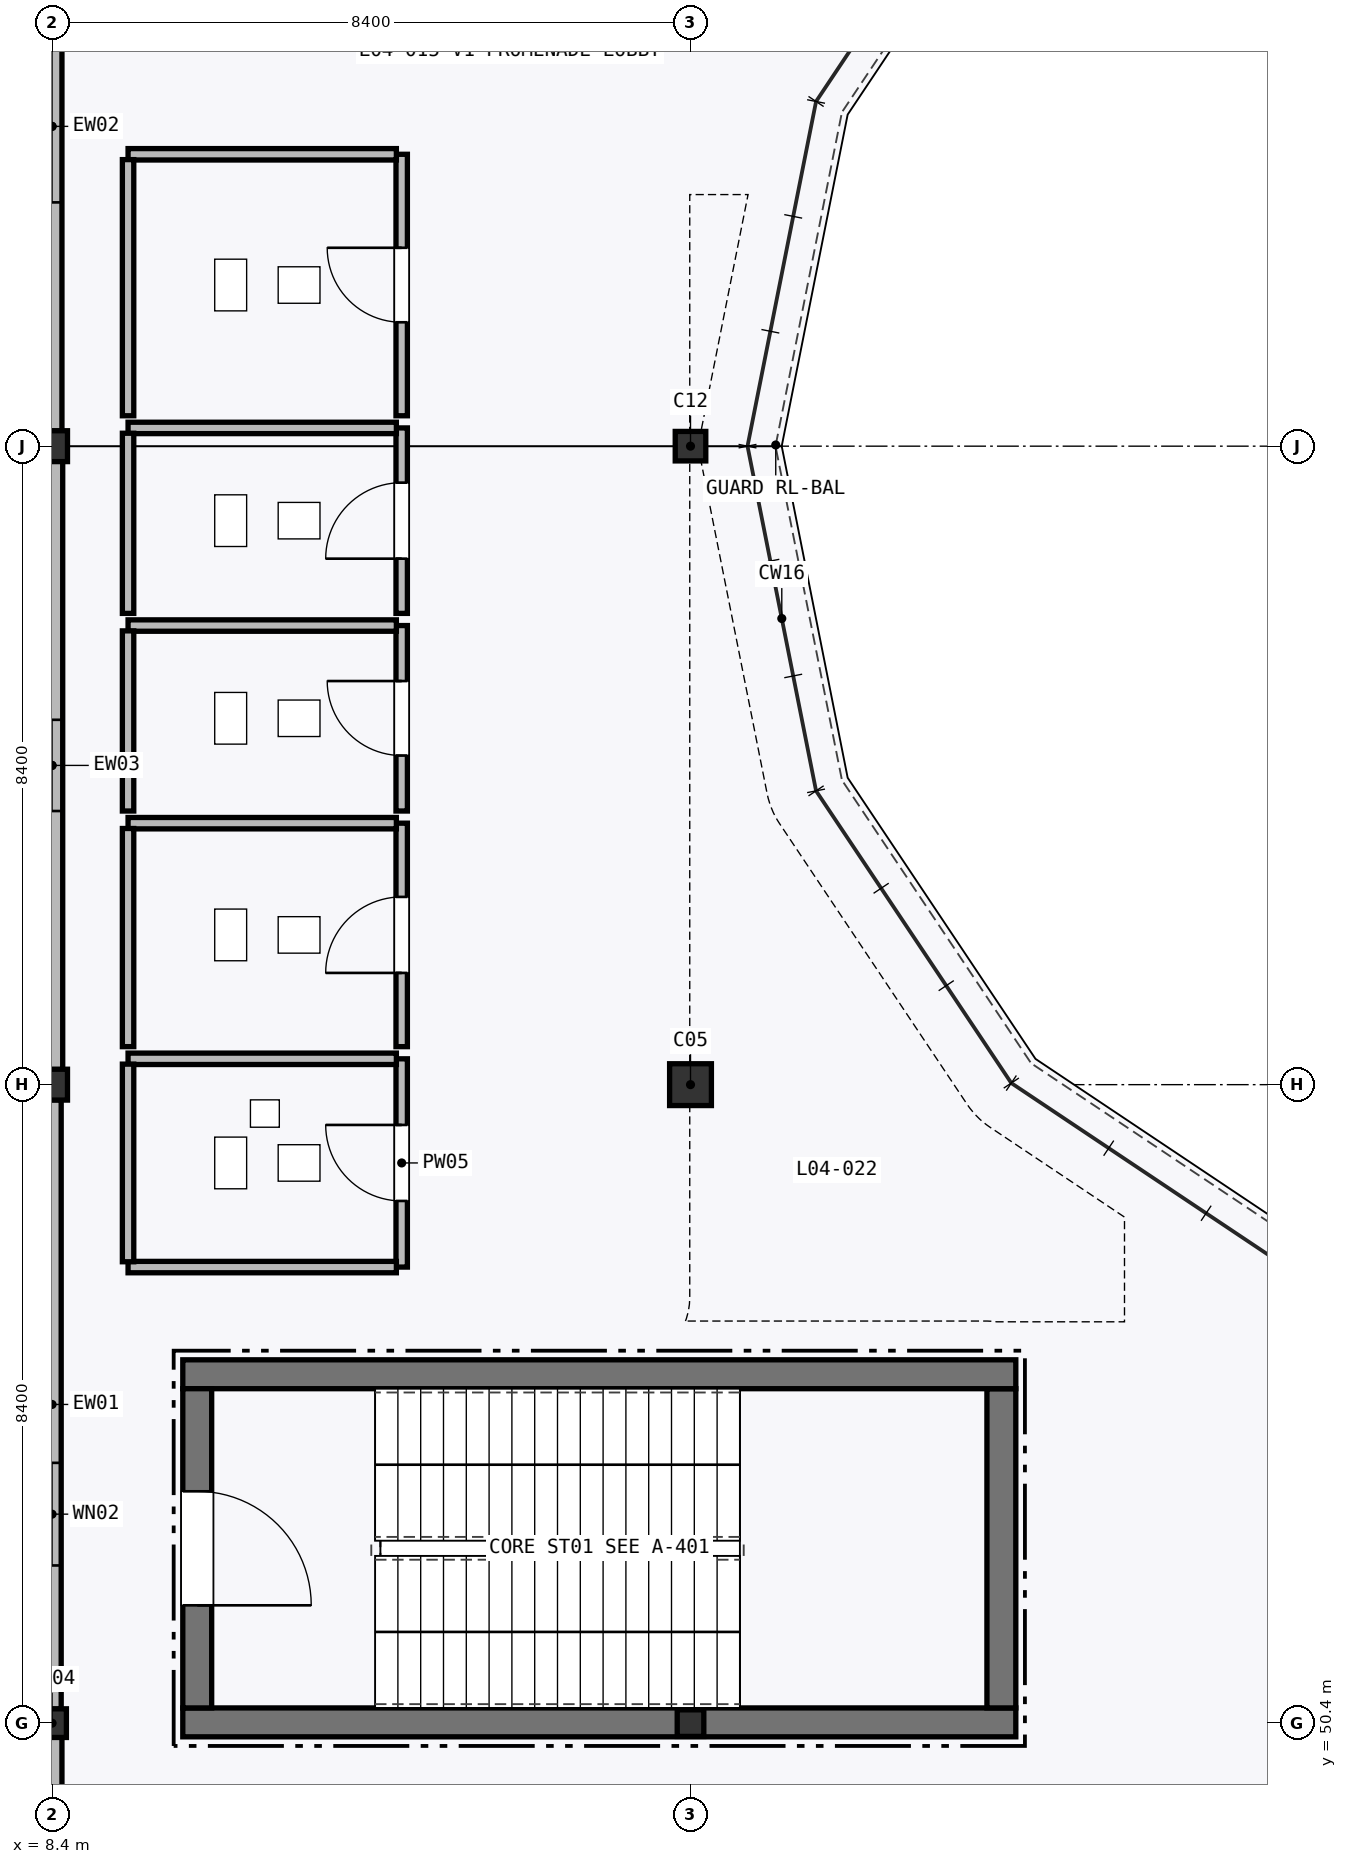
"""IFC4 building model, lengths in metres.
Left out: names, types, materials, properties, quantities, classifications, styles, units other than length and angle.
Written with IfcOpenShell. Run it as: python <this file> out.ifc"""

import sys

from ifc_helpers import new_model, si_unit, direction, frame, frame_2d, origin, origin_2d, place, context, subcontext, project, spatial, rectangle, hollow_rectangle, hollow_circle, i_section, extrude, element, fill, save


model = new_model("IFC4")
c1 = context("Model", 3, precision=1e-05, world=origin(), true_north=direction((0.0, 1.0)))
c2 = subcontext(c1, "Body", "Model", "MODEL_VIEW")
j1 = project(units=[si_unit("LENGTHUNIT", "METRE"), si_unit("PLANEANGLEUNIT", "RADIAN")], contexts=[c1])
p1 = place(None, origin())
s1 = spatial("IfcSite", under=j1, at=p1, CompositionType="ELEMENT")
p2 = place(p1, origin())
s2 = spatial("IfcBuilding", under=s1, at=p2, CompositionType="ELEMENT")
p3 = place(p2, frame((0.0, 0.0, 16.5)))
s3 = spatial("IfcBuildingStorey", under=s2, at=p3, CompositionType="ELEMENT", Elevation=16.5)
p4 = place(p3, frame((8.4, 50.4, 0.0), z_axis=(0.0, 0.0, 1.0), x_axis=(1.0, 0.0, 0.0)))
e1 = element("IfcColumn", 1, at=p4, inside=s3, PredefinedType="COLUMN", context=c2, shape_type="SweptSolid", body=[
    extrude(hollow_circle(Radius=0.188, WallThickness=0.014, at=origin_2d()), origin(), (0.0, 0.0, 1.0), 5.1),
])
for number, where, z_axis, x_axis in (
    (2, (8.4, 58.8, 0.0), (0.0, 0.0, 1.0), (1.0, 0.0, 0.0)),
    (3, (8.4, 67.2, 0.0), (0.0, 0.0, 1.0), (1.0, 0.0, 0.0)),
):
    element("IfcColumn", number, at=place(p3, frame(where, z_axis=z_axis, x_axis=x_axis)), inside=s3, PredefinedType="COLUMN", context=c2, shape_type="SweptSolid", body=[
        extrude(hollow_circle(Radius=0.203, WallThickness=0.016, at=origin_2d()), origin(), (0.0, 0.0, 1.0), 5.1),
    ])
p5 = place(p3, frame((16.8, 50.4, 0.0), z_axis=(0.0, 0.0, 1.0), x_axis=(1.0, 0.0, 0.0)))
e4 = element("IfcColumn", 4, at=p5, inside=s3, PredefinedType="COLUMN", context=c2, shape_type="SweptSolid", body=[
    extrude(i_section(OverallWidth=0.35, OverallDepth=0.35, WebThickness=0.012, FlangeThickness=0.019, FilletRadius=0.02, at=origin_2d()), origin(), (0.0, 0.0, 1.0), 5.1),
])
p6 = place(p3, frame((16.8, 58.8, 0.0), z_axis=(0.0, 0.0, 1.0), x_axis=(1.0, 0.0, 0.0)))
e5 = element("IfcColumn", 5, at=p6, inside=s3, PredefinedType="COLUMN", context=c2, shape_type="SweptSolid", body=[
    extrude(hollow_rectangle(XDim=0.55, YDim=0.55, WallThickness=0.022, at=origin_2d()), origin(), (0.0, 0.0, 1.0), 5.1),
])
p7 = place(p3, frame((16.8, 67.2, 0.0), z_axis=(0.0, 0.0, 1.0), x_axis=(1.0, 0.0, 0.0)))
e6 = element("IfcColumn", 6, at=p7, inside=s3, PredefinedType="COLUMN", context=c2, shape_type="SweptSolid", body=[
    extrude(i_section(OverallWidth=0.402, OverallDepth=0.388, WebThickness=0.015, FlangeThickness=0.015, FilletRadius=0.022, at=origin_2d()), origin(), (0.0, 0.0, 1.0), 5.1),
])
p8 = place(p3, frame((8.4, 75.417, 0.0), z_axis=(0.0, 0.0, 1.0), x_axis=(0.0, -1.0, 0.0)))
e7 = element("IfcWall", 7, at=p8, inside=s3, PredefinedType="STANDARD", context=c2, shape_type="SweptSolid", body=[
    extrude(rectangle(XDim=8.019, YDim=0.26, at=frame_2d((4.009, 0.0))), origin(), (0.0, 0.0, 1.0), 4.331),
])
p9 = place(p8, frame((3.009, 0.0, 0.95)))
e8 = element("IfcOpeningElement", 8, at=p9, cuts=e7, PredefinedType="OPENING", context=c2, shape_type="SweptSolid", body=[
    extrude(rectangle(XDim=2.0, YDim=1.6, at=frame_2d((1.0, 0.8))), frame((0.0, 0.14, 0.0), z_axis=(0.0, -1.0, 0.0), x_axis=(1.0, 0.0, 0.0)), (0.0, 0.0, 1.0), 0.28),
])
p10 = place(p3, frame((8.4, 67.002, 0.0), z_axis=(0.0, 0.0, 1.0), x_axis=(0.0, -1.0, 0.0)))
e9 = element("IfcWall", 9, at=p10, inside=s3, PredefinedType="STANDARD", context=c2, shape_type="SweptSolid", body=[
    extrude(rectangle(XDim=8.004, YDim=0.28, at=frame_2d((4.002, 0.0))), origin(), (0.0, 0.0, 1.0), 4.331),
])
p11 = place(p10, frame((3.402, 0.0, 0.95)))
e10 = element("IfcOpeningElement", 10, at=p11, cuts=e9, PredefinedType="OPENING", context=c2, shape_type="SweptSolid", body=[
    extrude(rectangle(XDim=1.2, YDim=1.8, at=frame_2d((0.6, 0.9))), frame((0.0, 0.15, 0.0), z_axis=(0.0, -1.0, 0.0), x_axis=(1.0, 0.0, 0.0)), (0.0, 0.0, 1.0), 0.3),
])
p12 = place(p3, frame((8.4, 58.602, 0.0), z_axis=(0.0, 0.0, 1.0), x_axis=(0.0, -1.0, 0.0)))
e11 = element("IfcWall", 11, at=p12, inside=s3, PredefinedType="STANDARD", context=c2, shape_type="SweptSolid", body=[
    extrude(rectangle(XDim=8.019, YDim=0.24, at=frame_2d((4.009, 0.0))), origin(), (0.0, 0.0, 1.0), 4.331),
])
p13 = place(p12, frame((4.778, 0.0, 0.95)))
e12 = element("IfcOpeningElement", 12, at=p13, cuts=e11, PredefinedType="OPENING", context=c2, shape_type="SweptSolid", body=[
    extrude(rectangle(XDim=1.35, YDim=1.8, at=frame_2d((0.675, 0.9))), frame((0.0, 0.13, 0.0), z_axis=(0.0, -1.0, 0.0), x_axis=(1.0, 0.0, 0.0)), (0.0, 0.0, 1.0), 0.26),
])
p14 = place(p3, frame((8.4, 50.217, 0.0), z_axis=(0.0, 0.0, 1.0), x_axis=(0.0, -1.0, 0.0)))
e13 = element("IfcWall", 13, at=p14, inside=s3, PredefinedType="STANDARD", context=c2, shape_type="SweptSolid", body=[
    extrude(rectangle(XDim=8.019, YDim=0.26, at=frame_2d((4.009, 0.0))), origin(), (0.0, 0.0, 1.0), 4.32),
])
p15 = place(p14, frame((3.259, 0.0, 0.95)))
e14 = element("IfcOpeningElement", 14, at=p15, cuts=e13, PredefinedType="OPENING", context=c2, shape_type="SweptSolid", body=[
    extrude(rectangle(XDim=1.5, YDim=1.8, at=frame_2d((0.75, 0.9))), frame((0.0, 0.14, 0.0), z_axis=(0.0, -1.0, 0.0), x_axis=(1.0, 0.0, 0.0)), (0.0, 0.0, 1.0), 0.28),
])
p16 = place(p3, frame((10.12, 50.41, 0.0), z_axis=(0.0, 0.0, 1.0), x_axis=(1.0, 0.0, 0.0)))
e15 = element("IfcWall", 15, at=p16, inside=s3, PredefinedType="SHEAR", context=c2, shape_type="SweptSolid", body=[
    extrude(rectangle(XDim=10.96, YDim=0.38, at=frame_2d((5.48, 0.0))), origin(), (0.0, 0.0, 1.0), 4.845),
])
p17 = place(p3, frame((20.89, 50.6, 0.0), z_axis=(0.0, 0.0, 1.0), x_axis=(0.0, 1.0, 0.0)))
e16 = element("IfcWall", 16, at=p17, inside=s3, PredefinedType="SHEAR", context=c2, shape_type="SweptSolid", body=[
    extrude(rectangle(XDim=4.2, YDim=0.38, at=frame_2d((2.1, 0.0))), origin(), (0.0, 0.0, 1.0), 4.845),
])
p18 = place(p3, frame((21.08, 54.99, 0.0), z_axis=(0.0, 0.0, 1.0), x_axis=(-1.0, 0.0, 0.0)))
e17 = element("IfcWall", 17, at=p18, inside=s3, PredefinedType="SHEAR", context=c2, shape_type="SweptSolid", body=[
    extrude(rectangle(XDim=10.96, YDim=0.38, at=frame_2d((5.48, 0.0))), origin(), (0.0, 0.0, 1.0), 4.845),
])
p19 = place(p3, frame((10.31, 54.8, 0.0), z_axis=(0.0, 0.0, 1.0), x_axis=(0.0, -1.0, 0.0)))
e18 = element("IfcWall", 18, at=p19, inside=s3, PredefinedType="SHEAR", context=c2, shape_type="SweptSolid", body=[
    extrude(rectangle(XDim=4.2, YDim=0.38, at=frame_2d((2.1, 0.0))), origin(), (0.0, 0.0, 1.0), 4.845),
])
p20 = place(p19, frame((1.35, 0.0, 0.0)))
e19 = element("IfcOpeningElement", 19, at=p20, cuts=e18, PredefinedType="OPENING", context=c2, shape_type="SweptSolid", body=[
    extrude(rectangle(XDim=1.5, YDim=2.15, at=frame_2d((0.75, 1.075))), frame((0.0, 0.2, 0.0), z_axis=(0.0, -1.0, 0.0), x_axis=(1.0, 0.0, 0.0)), (0.0, 0.0, 1.0), 0.4),
])
p21 = place(p3, frame((13.0, 56.4, 0.0), z_axis=(0.0, 0.0, 1.0), x_axis=(0.0, 1.0, 0.0)))
e20 = element("IfcWall", 20, at=p21, inside=s3, PredefinedType="PARTITIONING", context=c2, shape_type="SweptSolid", body=[
    extrude(rectangle(XDim=2.74, YDim=0.15, at=frame_2d((1.37, 0.0))), origin(), (0.0, 0.0, 1.0), 4.845),
])
p22 = place(p21, frame((0.87, 0.0, 0.0)))
e21 = element("IfcOpeningElement", 21, at=p22, cuts=e20, PredefinedType="OPENING", context=c2, shape_type="SweptSolid", body=[
    extrude(rectangle(XDim=1.0, YDim=2.1, at=frame_2d((0.5, 1.05))), frame((0.0, 0.085, 0.0), z_axis=(0.0, -1.0, 0.0), x_axis=(1.0, 0.0, 0.0)), (0.0, 0.0, 1.0), 0.17),
])
p23 = place(p3, frame((9.4, 56.4, 0.0), z_axis=(0.0, 0.0, 1.0), x_axis=(1.0, 0.0, 0.0)))
e22 = element("IfcWall", 22, at=p23, inside=s3, PredefinedType="PARTITIONING", context=c2, shape_type="SweptSolid", body=[
    extrude(rectangle(XDim=3.53, YDim=0.15, at=frame_2d((1.765, 0.0))), origin(), (0.0, 0.0, 1.0), 4.845),
])
p24 = place(p3, frame((12.93, 59.14, 0.0), z_axis=(0.0, 0.0, 1.0), x_axis=(-1.0, 0.0, 0.0)))
e23 = element("IfcWall", 23, at=p24, inside=s3, PredefinedType="PARTITIONING", context=c2, shape_type="SweptSolid", body=[
    extrude(rectangle(XDim=3.53, YDim=0.15, at=frame_2d((1.765, 0.0))), origin(), (0.0, 0.0, 1.0), 4.029),
])
p25 = place(p3, frame((9.4, 59.07, 0.0), z_axis=(0.0, 0.0, 1.0), x_axis=(0.0, -1.0, 0.0)))
e24 = element("IfcWall", 24, at=p25, inside=s3, PredefinedType="PARTITIONING", context=c2, shape_type="SweptSolid", body=[
    extrude(rectangle(XDim=2.6, YDim=0.15, at=frame_2d((1.3, 0.0))), origin(), (0.0, 0.0, 1.0), 4.845),
])
p26 = place(p3, frame((13.0, 59.3, 0.0), z_axis=(0.0, 0.0, 1.0), x_axis=(0.0, 1.0, 0.0)))
e25 = element("IfcWall", 25, at=p26, inside=s3, PredefinedType="PARTITIONING", context=c2, shape_type="SweptSolid", body=[
    extrude(rectangle(XDim=2.94, YDim=0.15, at=frame_2d((1.47, 0.0))), origin(), (0.0, 0.0, 1.0), 4.845),
])
p27 = place(p26, frame((0.97, 0.0, 0.0)))
e26 = element("IfcOpeningElement", 26, at=p27, cuts=e25, PredefinedType="OPENING", context=c2, shape_type="SweptSolid", body=[
    extrude(rectangle(XDim=1.0, YDim=2.1, at=frame_2d((0.5, 1.05))), frame((0.0, 0.085, 0.0), z_axis=(0.0, -1.0, 0.0), x_axis=(1.0, 0.0, 0.0)), (0.0, 0.0, 1.0), 0.17),
])
p28 = place(p3, frame((12.93, 62.24, 0.0), z_axis=(0.0, 0.0, 1.0), x_axis=(-1.0, 0.0, 0.0)))
e27 = element("IfcWall", 27, at=p28, inside=s3, PredefinedType="PARTITIONING", context=c2, shape_type="SweptSolid", body=[
    extrude(rectangle(XDim=3.53, YDim=0.15, at=frame_2d((1.765, 0.0))), origin(), (0.0, 0.0, 1.0), 4.845),
])
p29 = place(p3, frame((9.4, 62.17, 0.0), z_axis=(0.0, 0.0, 1.0), x_axis=(0.0, -1.0, 0.0)))
e28 = element("IfcWall", 28, at=p29, inside=s3, PredefinedType="PARTITIONING", context=c2, shape_type="SweptSolid", body=[
    extrude(rectangle(XDim=2.87, YDim=0.15, at=frame_2d((1.435, 0.0))), origin(), (0.0, 0.0, 1.0), 4.845),
])
p30 = place(p3, frame((13.0, 62.4, 0.0), z_axis=(0.0, 0.0, 1.0), x_axis=(0.0, 1.0, 0.0)))
e29 = element("IfcWall", 29, at=p30, inside=s3, PredefinedType="PARTITIONING", context=c2, shape_type="SweptSolid", body=[
    extrude(rectangle(XDim=2.44, YDim=0.15, at=frame_2d((1.22, 0.0))), origin(), (0.0, 0.0, 1.0), 4.845),
])
p31 = place(p30, frame((0.73, 0.0, 0.0)))
e30 = element("IfcOpeningElement", 30, at=p31, cuts=e29, PredefinedType="OPENING", context=c2, shape_type="SweptSolid", body=[
    extrude(rectangle(XDim=0.98, YDim=2.1, at=frame_2d((0.49, 1.05))), frame((0.0, 0.085, 0.0), z_axis=(0.0, -1.0, 0.0), x_axis=(1.0, 0.0, 0.0)), (0.0, 0.0, 1.0), 0.17),
])
p32 = place(p3, frame((12.93, 64.84, 0.0), z_axis=(0.0, 0.0, 1.0), x_axis=(-1.0, 0.0, 0.0)))
e31 = element("IfcWall", 31, at=p32, inside=s3, PredefinedType="PARTITIONING", context=c2, shape_type="SweptSolid", body=[
    extrude(rectangle(XDim=3.53, YDim=0.15, at=frame_2d((1.765, 0.0))), origin(), (0.0, 0.0, 1.0), 4.845),
])
p33 = place(p3, frame((9.4, 64.77, 0.0), z_axis=(0.0, 0.0, 1.0), x_axis=(0.0, -1.0, 0.0)))
e32 = element("IfcWall", 32, at=p33, inside=s3, PredefinedType="PARTITIONING", context=c2, shape_type="SweptSolid", body=[
    extrude(rectangle(XDim=2.37, YDim=0.15, at=frame_2d((1.185, 0.0))), origin(), (0.0, 0.0, 1.0), 4.845),
])
p34 = place(p3, frame((13.0, 65.0, 0.0), z_axis=(0.0, 0.0, 1.0), x_axis=(0.0, 1.0, 0.0)))
e33 = element("IfcWall", 33, at=p34, inside=s3, PredefinedType="PARTITIONING", context=c2, shape_type="SweptSolid", body=[
    extrude(rectangle(XDim=2.44, YDim=0.15, at=frame_2d((1.22, 0.0))), origin(), (0.0, 0.0, 1.0), 4.845),
])
p35 = place(p34, frame((0.72, 0.0, 0.0)))
e34 = element("IfcOpeningElement", 34, at=p35, cuts=e33, PredefinedType="OPENING", context=c2, shape_type="SweptSolid", body=[
    extrude(rectangle(XDim=1.0, YDim=2.1, at=frame_2d((0.5, 1.05))), frame((0.0, 0.085, 0.0), z_axis=(0.0, -1.0, 0.0), x_axis=(1.0, 0.0, 0.0)), (0.0, 0.0, 1.0), 0.17),
])
p36 = place(p3, frame((12.93, 67.44, 0.0), z_axis=(0.0, 0.0, 1.0), x_axis=(-1.0, 0.0, 0.0)))
e35 = element("IfcWall", 35, at=p36, inside=s3, PredefinedType="PARTITIONING", context=c2, shape_type="SweptSolid", body=[
    extrude(rectangle(XDim=3.53, YDim=0.15, at=frame_2d((1.765, 0.0))), origin(), (0.0, 0.0, 1.0), 4.231),
])
p37 = place(p3, frame((9.4, 67.37, 0.0), z_axis=(0.0, 0.0, 1.0), x_axis=(0.0, -1.0, 0.0)))
e36 = element("IfcWall", 36, at=p37, inside=s3, PredefinedType="PARTITIONING", context=c2, shape_type="SweptSolid", body=[
    extrude(rectangle(XDim=2.37, YDim=0.15, at=frame_2d((1.185, 0.0))), origin(), (0.0, 0.0, 1.0), 4.845),
])
p38 = place(p3, frame((13.0, 67.6, 0.0), z_axis=(0.0, 0.0, 1.0), x_axis=(0.0, 1.0, 0.0)))
e37 = element("IfcWall", 37, at=p38, inside=s3, PredefinedType="PARTITIONING", context=c2, shape_type="SweptSolid", body=[
    extrude(rectangle(XDim=3.44, YDim=0.15, at=frame_2d((1.72, 0.0))), origin(), (0.0, 0.0, 1.0), 4.845),
])
p39 = place(p38, frame((1.23, 0.0, 0.0)))
e38 = element("IfcOpeningElement", 38, at=p39, cuts=e37, PredefinedType="OPENING", context=c2, shape_type="SweptSolid", body=[
    extrude(rectangle(XDim=0.98, YDim=2.1, at=frame_2d((0.49, 1.05))), frame((0.0, 0.085, 0.0), z_axis=(0.0, -1.0, 0.0), x_axis=(1.0, 0.0, 0.0)), (0.0, 0.0, 1.0), 0.17),
])
p40 = place(p3, frame((12.93, 71.04, 0.0), z_axis=(0.0, 0.0, 1.0), x_axis=(-1.0, 0.0, 0.0)))
e39 = element("IfcWall", 39, at=p40, inside=s3, PredefinedType="PARTITIONING", context=c2, shape_type="SweptSolid", body=[
    extrude(rectangle(XDim=3.53, YDim=0.15, at=frame_2d((1.765, 0.0))), origin(), (0.0, 0.0, 1.0), 4.845),
])
p41 = place(p3, frame((9.4, 70.97, 0.0), z_axis=(0.0, 0.0, 1.0), x_axis=(0.0, -1.0, 0.0)))
e40 = element("IfcWall", 40, at=p41, inside=s3, PredefinedType="PARTITIONING", context=c2, shape_type="SweptSolid", body=[
    extrude(rectangle(XDim=3.37, YDim=0.15, at=frame_2d((1.685, 0.0))), origin(), (0.0, 0.0, 1.0), 4.845),
])
p42 = place(p9, origin())
e41 = element("IfcWindow", 41, at=p42, inside=s3, PartitioningType="SINGLE_PANEL", PredefinedType="WINDOW", context=c2, shape_type="SweptSolid", body=[
    extrude(rectangle(XDim=2.0, YDim=1.6, at=frame_2d((1.0, 0.8))), frame((0.0, 0.03, 0.0), z_axis=(0.0, -1.0, 0.0), x_axis=(1.0, 0.0, 0.0)), (0.0, 0.0, 1.0), 0.06),
])
fill(e8, e41)
p43 = place(p11, origin())
e42 = element("IfcWindow", 42, at=p43, inside=s3, PartitioningType="SINGLE_PANEL", PredefinedType="WINDOW", context=c2, shape_type="SweptSolid", body=[
    extrude(rectangle(XDim=1.2, YDim=1.8, at=frame_2d((0.6, 0.9))), frame((0.0, 0.03, 0.0), z_axis=(0.0, -1.0, 0.0), x_axis=(1.0, 0.0, 0.0)), (0.0, 0.0, 1.0), 0.06),
])
fill(e10, e42)
p44 = place(p13, origin())
e43 = element("IfcWindow", 43, at=p44, inside=s3, PartitioningType="SINGLE_PANEL", PredefinedType="WINDOW", context=c2, shape_type="SweptSolid", body=[
    extrude(rectangle(XDim=1.35, YDim=1.8, at=frame_2d((0.675, 0.9))), frame((0.0, 0.03, 0.0), z_axis=(0.0, -1.0, 0.0), x_axis=(1.0, 0.0, 0.0)), (0.0, 0.0, 1.0), 0.06),
])
fill(e12, e43)
p45 = place(p20, origin())
e44 = element("IfcDoor", 44, at=p45, inside=s3, OperationType="SINGLE_SWING_RIGHT", PredefinedType="DOOR", context=c2, shape_type="SweptSolid", body=[
    extrude(rectangle(XDim=1.5, YDim=2.15, at=frame_2d((0.75, 1.075))), frame((0.0, 0.025, 0.0), z_axis=(0.0, -1.0, 0.0), x_axis=(1.0, 0.0, 0.0)), (0.0, 0.0, 1.0), 0.05),
])
fill(e19, e44)
p46 = place(p22, origin())
e45 = element("IfcDoor", 45, at=p46, inside=s3, OperationType="SINGLE_SWING_RIGHT", PredefinedType="DOOR", context=c2, shape_type="SweptSolid", body=[
    extrude(rectangle(XDim=1.0, YDim=2.1, at=frame_2d((0.5, 1.05))), frame((0.0, 0.025, 0.0), z_axis=(0.0, -1.0, 0.0), x_axis=(1.0, 0.0, 0.0)), (0.0, 0.0, 1.0), 0.05),
])
fill(e21, e45)
p47 = place(p27, origin())
e46 = element("IfcDoor", 46, at=p47, inside=s3, OperationType="SINGLE_SWING_LEFT", PredefinedType="DOOR", context=c2, shape_type="SweptSolid", body=[
    extrude(rectangle(XDim=1.0, YDim=2.1, at=frame_2d((0.5, 1.05))), frame((0.0, 0.025, 0.0), z_axis=(0.0, -1.0, 0.0), x_axis=(1.0, 0.0, 0.0)), (0.0, 0.0, 1.0), 0.05),
])
fill(e26, e46)
p48 = place(p31, origin())
e47 = element("IfcDoor", 47, at=p48, inside=s3, OperationType="SINGLE_SWING_RIGHT", PredefinedType="DOOR", context=c2, shape_type="SweptSolid", body=[
    extrude(rectangle(XDim=0.98, YDim=2.1, at=frame_2d((0.49, 1.05))), frame((0.0, 0.025, 0.0), z_axis=(0.0, -1.0, 0.0), x_axis=(1.0, 0.0, 0.0)), (0.0, 0.0, 1.0), 0.05),
])
fill(e30, e47)
p49 = place(p35, origin())
e48 = element("IfcDoor", 48, at=p49, inside=s3, OperationType="SINGLE_SWING_LEFT", PredefinedType="DOOR", context=c2, shape_type="SweptSolid", body=[
    extrude(rectangle(XDim=1.0, YDim=2.1, at=frame_2d((0.5, 1.05))), frame((0.0, 0.025, 0.0), z_axis=(0.0, -1.0, 0.0), x_axis=(1.0, 0.0, 0.0)), (0.0, 0.0, 1.0), 0.05),
])
fill(e34, e48)
p50 = place(p39, origin())
e49 = element("IfcDoor", 49, at=p50, inside=s3, OperationType="SINGLE_SWING_RIGHT", PredefinedType="DOOR", context=c2, shape_type="SweptSolid", body=[
    extrude(rectangle(XDim=0.98, YDim=2.1, at=frame_2d((0.49, 1.05))), frame((0.0, 0.025, 0.0), z_axis=(0.0, -1.0, 0.0), x_axis=(1.0, 0.0, 0.0)), (0.0, 0.0, 1.0), 0.05),
])
fill(e38, e49)
save(model, sys.argv[1])
